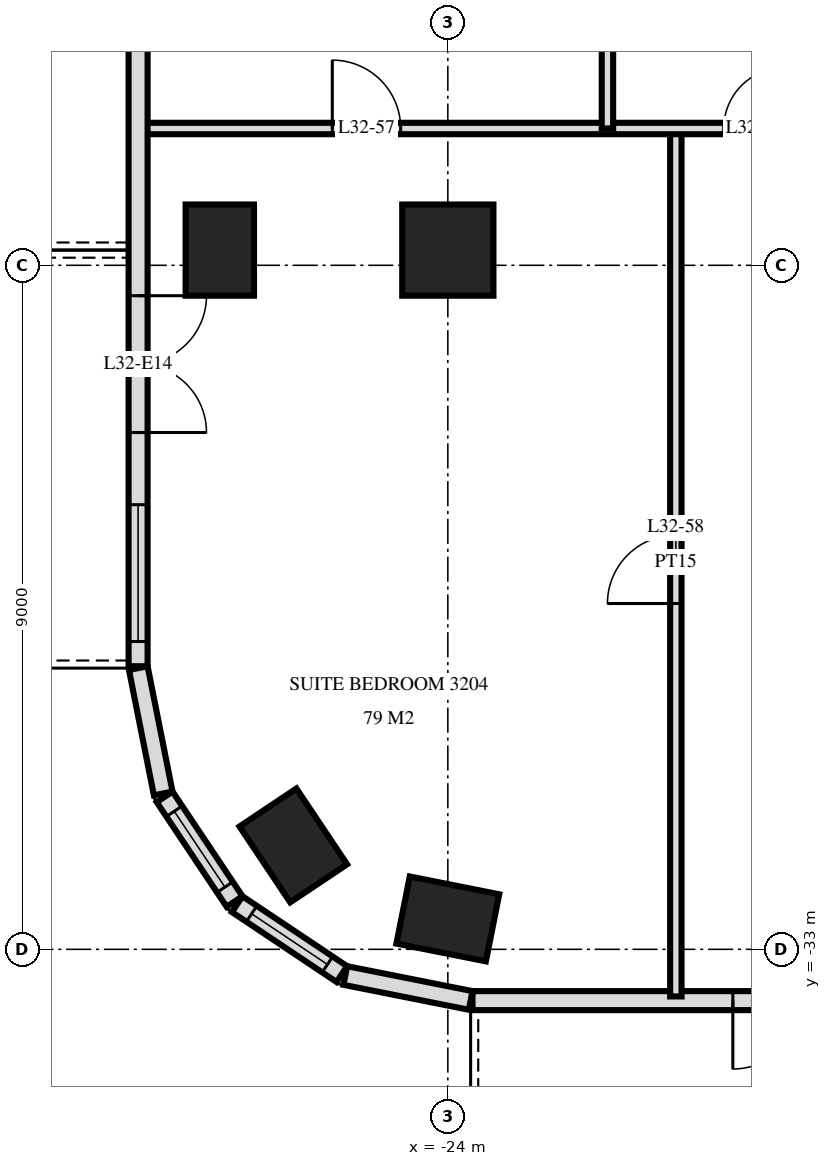
"""IFC4 building model, lengths in metres.
Left out: names, types, materials, properties, quantities, classifications, styles, units other than length and angle.
Written with IfcOpenShell. Run it as: python <this file> out.ifc"""

import sys

from ifc_helpers import new_model, si_unit, direction, frame, frame_2d, origin, origin_2d, place, context, subcontext, project, spatial, rectangle, extrude, element, fill, save


model = new_model("IFC4")
c1 = context("Model", 3, precision=1e-05, world=origin(), true_north=direction((0.0, 1.0)))
c2 = subcontext(c1, "Body", "Model", "MODEL_VIEW")
j1 = project(units=[si_unit("LENGTHUNIT", "METRE"), si_unit("PLANEANGLEUNIT", "RADIAN")], contexts=[c1])
p1 = place(None, origin())
s1 = spatial("IfcSite", under=j1, at=p1, CompositionType="ELEMENT")
p2 = place(p1, origin())
s2 = spatial("IfcBuilding", under=s1, at=p2, CompositionType="ELEMENT")
p3 = place(p2, frame((0.0, 0.0, 127.2)))
s3 = spatial("IfcBuildingStorey", under=s2, at=p3, CompositionType="ELEMENT", Elevation=127.2)
for number, where, z_axis, x_axis in (
    (1, (-27.0, -23.8, 0.0), (0.0, 0.0, 1.0), (0.0, 1.0, 0.0)),
    (2, (-26.033, -31.633, 0.0), (0.0, 0.0, 1.0), (-0.556, 0.831, 0.0)),
    (3, (-24.0, -32.6, 0.0), (0.0, 0.0, 1.0), (-0.981, 0.195, 0.0)),
):
    element("IfcColumn", number, at=place(p3, frame(where, z_axis=z_axis, x_axis=x_axis)), inside=s3, PredefinedType="COLUMN", context=c2, shape_type="SweptSolid", body=[
        extrude(rectangle(XDim=1.2, YDim=0.9, at=origin_2d()), origin(), (0.0, 0.0, 1.0), 3.6),
    ])
p4 = place(p3, frame((-24.0, -23.8, 0.0), z_axis=(0.0, 0.0, 1.0), x_axis=(1.0, 0.0, 0.0)))
e4 = element("IfcColumn", 4, at=p4, inside=s3, PredefinedType="COLUMN", context=c2, shape_type="SweptSolid", body=[
    extrude(rectangle(XDim=1.2, YDim=1.2, at=origin_2d()), origin(), (0.0, 0.0, 1.0), 3.6),
])
p5 = place(p3, frame((-28.075, -3.325, 0.0), z_axis=(0.0, 0.0, 1.0), x_axis=(0.0, -1.0, 0.0)))
e5 = element("IfcWall", 5, at=p5, inside=s3, PredefinedType="SOLIDWALL", context=c2, shape_type="SweptSolid", body=[
    extrude(rectangle(XDim=25.951, YDim=0.25, at=frame_2d((12.975, 0.0))), origin(), (0.0, 0.0, 1.0), 3.32),
])
p6 = place(p5, frame((6.575, 0.0, 0.0)))
e6 = element("IfcOpeningElement", 6, at=p6, cuts=e5, PredefinedType="OPENING", context=c2, shape_type="SweptSolid", body=[
    extrude(rectangle(XDim=1.8, YDim=2.4, at=frame_2d((0.9, 1.2))), frame((0.0, 0.135, 0.0), z_axis=(0.0, -1.0, 0.0), x_axis=(1.0, 0.0, 0.0)), (0.0, 0.0, 1.0), 0.27),
])
p7 = place(p5, frame((9.425, 0.0, 0.3)))
e7 = element("IfcOpeningElement", 7, at=p7, cuts=e5, PredefinedType="OPENING", context=c2, shape_type="SweptSolid", body=[
    extrude(rectangle(XDim=1.8, YDim=2.1, at=frame_2d((0.9, 1.05))), frame((0.0, 0.135, 0.0), z_axis=(0.0, -1.0, 0.0), x_axis=(1.0, 0.0, 0.0)), (0.0, 0.0, 1.0), 0.27),
])
p8 = place(p5, frame((12.575, 0.0, 0.3)))
e8 = element("IfcOpeningElement", 8, at=p8, cuts=e5, PredefinedType="OPENING", context=c2, shape_type="SweptSolid", body=[
    extrude(rectangle(XDim=1.2, YDim=2.1, at=frame_2d((0.6, 1.05))), frame((0.0, 0.135, 0.0), z_axis=(0.0, -1.0, 0.0), x_axis=(1.0, 0.0, 0.0)), (0.0, 0.0, 1.0), 0.27),
])
p9 = place(p5, frame((15.875, 0.0, 0.0)))
e9 = element("IfcOpeningElement", 9, at=p9, cuts=e5, PredefinedType="OPENING", context=c2, shape_type="SweptSolid", body=[
    extrude(rectangle(XDim=1.8, YDim=2.4, at=frame_2d((0.9, 1.2))), frame((0.0, 0.135, 0.0), z_axis=(0.0, -1.0, 0.0), x_axis=(1.0, 0.0, 0.0)), (0.0, 0.0, 1.0), 0.27),
])
p10 = place(p5, frame((21.075, 0.0, 0.0)))
e10 = element("IfcOpeningElement", 10, at=p10, cuts=e5, PredefinedType="OPENING", context=c2, shape_type="SweptSolid", body=[
    extrude(rectangle(XDim=1.8, YDim=2.4, at=frame_2d((0.9, 1.2))), frame((0.0, 0.135, 0.0), z_axis=(0.0, -1.0, 0.0), x_axis=(1.0, 0.0, 0.0)), (0.0, 0.0, 1.0), 0.27),
])
p11 = place(p5, frame((23.825, 0.0, 0.3)))
e11 = element("IfcOpeningElement", 11, at=p11, cuts=e5, PredefinedType="OPENING", context=c2, shape_type="SweptSolid", body=[
    extrude(rectangle(XDim=1.8, YDim=2.1, at=frame_2d((0.9, 1.05))), frame((0.0, 0.135, 0.0), z_axis=(0.0, -1.0, 0.0), x_axis=(1.0, 0.0, 0.0)), (0.0, 0.0, 1.0), 0.27),
])
p12 = place(p3, frame((-28.073, -29.3, 0.0), z_axis=(0.0, 0.0, 1.0), x_axis=(0.194999110559, -0.980803419081, 0.0)))
e12 = element("IfcWall", 12, at=p12, inside=s3, PredefinedType="SOLIDWALL", context=c2, shape_type="SweptSolid", body=[
    extrude(rectangle(XDim=1.681, YDim=0.25, at=frame_2d((0.841, 0.0))), origin(), (0.0, 0.0, 1.0), 3.32),
])
p13 = place(p3, frame((-27.726, -30.994, 0.0), z_axis=(0.0, 0.0, 1.0), x_axis=(0.55555029066, -0.831482937015, 0.0)))
e13 = element("IfcWall", 13, at=p13, inside=s3, PredefinedType="SOLIDWALL", context=c2, shape_type="SweptSolid", body=[
    extrude(rectangle(XDim=1.656, YDim=0.25, at=frame_2d((0.828, 0.0))), origin(), (0.0, 0.0, 1.0), 3.32),
])
p14 = place(p13, frame((0.228, 0.0, 0.9)))
e14 = element("IfcOpeningElement", 14, at=p14, cuts=e13, PredefinedType="OPENING", context=c2, shape_type="SweptSolid", body=[
    extrude(rectangle(XDim=1.2, YDim=1.5, at=frame_2d((0.6, 0.75))), frame((0.0, 0.135, 0.0), z_axis=(0.0, -1.0, 0.0), x_axis=(1.0, 0.0, 0.0)), (0.0, 0.0, 1.0), 0.27),
])
p15 = place(p3, frame((-26.771, -32.406, 0.0), z_axis=(0.0, 0.0, 1.0), x_axis=(0.831482937015, -0.55555029066, 0.0)))
e15 = element("IfcWall", 15, at=p15, inside=s3, PredefinedType="SOLIDWALL", context=c2, shape_type="SweptSolid", body=[
    extrude(rectangle(XDim=1.656, YDim=0.25, at=frame_2d((0.828, 0.0))), origin(), (0.0, 0.0, 1.0), 3.32),
])
p16 = place(p15, frame((0.228, 0.0, 0.9)))
e16 = element("IfcOpeningElement", 16, at=p16, cuts=e15, PredefinedType="OPENING", context=c2, shape_type="SweptSolid", body=[
    extrude(rectangle(XDim=1.2, YDim=1.5, at=frame_2d((0.6, 0.75))), frame((0.0, 0.135, 0.0), z_axis=(0.0, -1.0, 0.0), x_axis=(1.0, 0.0, 0.0)), (0.0, 0.0, 1.0), 0.27),
])
p17 = place(p3, frame((-25.349, -33.344, 0.0), z_axis=(0.0, 0.0, 1.0), x_axis=(0.980775640221, -0.19513878023, 0.0)))
e17 = element("IfcWall", 17, at=p17, inside=s3, PredefinedType="SOLIDWALL", context=c2, shape_type="SweptSolid", body=[
    extrude(rectangle(XDim=1.681, YDim=0.25, at=frame_2d((0.841, 0.0))), origin(), (0.0, 0.0, 1.0), 3.32),
])
p18 = place(p3, frame((-23.675, -33.675, 0.0), z_axis=(0.0, 0.0, 1.0), x_axis=(1.0, 0.0, 0.0)))
e18 = element("IfcWall", 18, at=p18, inside=s3, PredefinedType="SOLIDWALL", context=c2, shape_type="SweptSolid", body=[
    extrude(rectangle(XDim=47.351, YDim=0.25, at=frame_2d((23.675, 0.0))), origin(), (0.0, 0.0, 1.0), 3.32),
])
p19 = place(p18, frame((3.425, 0.0, 0.0)))
e19 = element("IfcOpeningElement", 19, at=p19, cuts=e18, PredefinedType="OPENING", context=c2, shape_type="SweptSolid", body=[
    extrude(rectangle(XDim=1.8, YDim=2.4, at=frame_2d((0.9, 1.2))), frame((0.0, 0.135, 0.0), z_axis=(0.0, -1.0, 0.0), x_axis=(1.0, 0.0, 0.0)), (0.0, 0.0, 1.0), 0.27),
])
p20 = place(p18, frame((6.275, 0.0, 0.0)))
e20 = element("IfcOpeningElement", 20, at=p20, cuts=e18, PredefinedType="OPENING", context=c2, shape_type="SweptSolid", body=[
    extrude(rectangle(XDim=1.8, YDim=2.4, at=frame_2d((0.9, 1.2))), frame((0.0, 0.135, 0.0), z_axis=(0.0, -1.0, 0.0), x_axis=(1.0, 0.0, 0.0)), (0.0, 0.0, 1.0), 0.27),
])
p21 = place(p18, frame((8.975, 0.0, 0.3)))
e21 = element("IfcOpeningElement", 21, at=p21, cuts=e18, PredefinedType="OPENING", context=c2, shape_type="SweptSolid", body=[
    extrude(rectangle(XDim=2.4, YDim=2.1, at=frame_2d((1.2, 1.05))), frame((0.0, 0.135, 0.0), z_axis=(0.0, -1.0, 0.0), x_axis=(1.0, 0.0, 0.0)), (0.0, 0.0, 1.0), 0.27),
])
p22 = place(p18, frame((12.275, 0.0, 0.0)))
e22 = element("IfcOpeningElement", 22, at=p22, cuts=e18, PredefinedType="OPENING", context=c2, shape_type="SweptSolid", body=[
    extrude(rectangle(XDim=1.8, YDim=2.4, at=frame_2d((0.9, 1.2))), frame((0.0, 0.135, 0.0), z_axis=(0.0, -1.0, 0.0), x_axis=(1.0, 0.0, 0.0)), (0.0, 0.0, 1.0), 0.27),
])
p23 = place(p18, frame((14.975, 0.0, 0.3)))
e23 = element("IfcOpeningElement", 23, at=p23, cuts=e18, PredefinedType="OPENING", context=c2, shape_type="SweptSolid", body=[
    extrude(rectangle(XDim=2.4, YDim=2.1, at=frame_2d((1.2, 1.05))), frame((0.0, 0.135, 0.0), z_axis=(0.0, -1.0, 0.0), x_axis=(1.0, 0.0, 0.0)), (0.0, 0.0, 1.0), 0.27),
])
p24 = place(p18, frame((17.975, 0.0, 0.3)))
e24 = element("IfcOpeningElement", 24, at=p24, cuts=e18, PredefinedType="OPENING", context=c2, shape_type="SweptSolid", body=[
    extrude(rectangle(XDim=2.4, YDim=2.1, at=frame_2d((1.2, 1.05))), frame((0.0, 0.135, 0.0), z_axis=(0.0, -1.0, 0.0), x_axis=(1.0, 0.0, 0.0)), (0.0, 0.0, 1.0), 0.27),
])
p25 = place(p18, frame((21.275, 0.0, 0.0)))
e25 = element("IfcOpeningElement", 25, at=p25, cuts=e18, PredefinedType="OPENING", context=c2, shape_type="SweptSolid", body=[
    extrude(rectangle(XDim=1.8, YDim=2.4, at=frame_2d((0.9, 1.2))), frame((0.0, 0.135, 0.0), z_axis=(0.0, -1.0, 0.0), x_axis=(1.0, 0.0, 0.0)), (0.0, 0.0, 1.0), 0.27),
])
p26 = place(p18, frame((24.275, 0.0, 0.0)))
e26 = element("IfcOpeningElement", 26, at=p26, cuts=e18, PredefinedType="OPENING", context=c2, shape_type="SweptSolid", body=[
    extrude(rectangle(XDim=1.8, YDim=2.4, at=frame_2d((0.9, 1.2))), frame((0.0, 0.135, 0.0), z_axis=(0.0, -1.0, 0.0), x_axis=(1.0, 0.0, 0.0)), (0.0, 0.0, 1.0), 0.27),
])
p27 = place(p18, frame((26.975, 0.0, 0.3)))
e27 = element("IfcOpeningElement", 27, at=p27, cuts=e18, PredefinedType="OPENING", context=c2, shape_type="SweptSolid", body=[
    extrude(rectangle(XDim=2.4, YDim=2.1, at=frame_2d((1.2, 1.05))), frame((0.0, 0.135, 0.0), z_axis=(0.0, -1.0, 0.0), x_axis=(1.0, 0.0, 0.0)), (0.0, 0.0, 1.0), 0.27),
])
p28 = place(p18, frame((30.275, 0.0, 0.0)))
e28 = element("IfcOpeningElement", 28, at=p28, cuts=e18, PredefinedType="OPENING", context=c2, shape_type="SweptSolid", body=[
    extrude(rectangle(XDim=1.8, YDim=2.4, at=frame_2d((0.9, 1.2))), frame((0.0, 0.135, 0.0), z_axis=(0.0, -1.0, 0.0), x_axis=(1.0, 0.0, 0.0)), (0.0, 0.0, 1.0), 0.27),
])
p29 = place(p18, frame((32.975, 0.0, 0.3)))
e29 = element("IfcOpeningElement", 29, at=p29, cuts=e18, PredefinedType="OPENING", context=c2, shape_type="SweptSolid", body=[
    extrude(rectangle(XDim=2.4, YDim=2.1, at=frame_2d((1.2, 1.05))), frame((0.0, 0.135, 0.0), z_axis=(0.0, -1.0, 0.0), x_axis=(1.0, 0.0, 0.0)), (0.0, 0.0, 1.0), 0.27),
])
p30 = place(p18, frame((36.275, 0.0, 0.0)))
e30 = element("IfcOpeningElement", 30, at=p30, cuts=e18, PredefinedType="OPENING", context=c2, shape_type="SweptSolid", body=[
    extrude(rectangle(XDim=1.8, YDim=2.4, at=frame_2d((0.9, 1.2))), frame((0.0, 0.135, 0.0), z_axis=(0.0, -1.0, 0.0), x_axis=(1.0, 0.0, 0.0)), (0.0, 0.0, 1.0), 0.27),
])
p31 = place(p18, frame((38.975, 0.0, 0.3)))
e31 = element("IfcOpeningElement", 31, at=p31, cuts=e18, PredefinedType="OPENING", context=c2, shape_type="SweptSolid", body=[
    extrude(rectangle(XDim=2.4, YDim=2.1, at=frame_2d((1.2, 1.05))), frame((0.0, 0.135, 0.0), z_axis=(0.0, -1.0, 0.0), x_axis=(1.0, 0.0, 0.0)), (0.0, 0.0, 1.0), 0.27),
])
p32 = place(p18, frame((41.975, 0.0, 0.3)))
e32 = element("IfcOpeningElement", 32, at=p32, cuts=e18, PredefinedType="OPENING", context=c2, shape_type="SweptSolid", body=[
    extrude(rectangle(XDim=2.4, YDim=2.1, at=frame_2d((1.2, 1.05))), frame((0.0, 0.135, 0.0), z_axis=(0.0, -1.0, 0.0), x_axis=(1.0, 0.0, 0.0)), (0.0, 0.0, 1.0), 0.27),
])
p33 = place(p18, frame((45.125, 0.0, 0.0)))
e33 = element("IfcOpeningElement", 33, at=p33, cuts=e18, PredefinedType="OPENING", context=c2, shape_type="SweptSolid", body=[
    extrude(rectangle(XDim=1.8, YDim=2.4, at=frame_2d((0.9, 1.2))), frame((0.0, 0.135, 0.0), z_axis=(0.0, -1.0, 0.0), x_axis=(1.0, 0.0, 0.0)), (0.0, 0.0, 1.0), 0.27),
])
p34 = place(p3, frame((-21.0, -33.62, 0.0), z_axis=(0.0, 0.0, 1.0), x_axis=(0.0, 1.0, 0.0)))
e34 = element("IfcWall", 34, at=p34, inside=s3, PredefinedType="PARTITIONING", context=c2, shape_type="SweptSolid", body=[
    extrude(rectangle(XDim=11.42, YDim=0.15, at=frame_2d((5.71, 0.0))), origin(), (0.0, 0.0, 1.0), 3.32),
])
p35 = place(p34, frame((5.17, 0.0, 0.0)))
e35 = element("IfcOpeningElement", 35, at=p35, cuts=e34, PredefinedType="OPENING", context=c2, shape_type="SweptSolid", body=[
    extrude(rectangle(XDim=0.9, YDim=2.1, at=frame_2d((0.45, 1.05))), frame((0.0, 0.085, 0.0), z_axis=(0.0, -1.0, 0.0), x_axis=(1.0, 0.0, 0.0)), (0.0, 0.0, 1.0), 0.17),
])
p36 = place(p3, frame((-21.9, -22.2, 0.0), z_axis=(0.0, 0.0, 1.0), x_axis=(0.0, 1.0, 0.0)))
e36 = element("IfcWall", 36, at=p36, inside=s3, PredefinedType="PARTITIONING", context=c2, shape_type="SweptSolid", body=[
    extrude(rectangle(XDim=4.2, YDim=0.15, at=frame_2d((2.1, 0.0))), origin(), (0.0, 0.0, 1.0), 3.32),
])
p37 = place(p3, frame((-28.02, -22.2, 0.0), z_axis=(0.0, 0.0, 1.0), x_axis=(1.0, 0.0, 0.0)))
e37 = element("IfcWall", 37, at=p37, inside=s3, PredefinedType="PARTITIONING", context=c2, shape_type="SweptSolid", body=[
    extrude(rectangle(XDim=9.12, YDim=0.15, at=frame_2d((4.56, 0.0))), origin(), (0.0, 0.0, 1.0), 3.32),
])
p38 = place(p37, frame((7.65, 0.0, 0.0)))
e38 = element("IfcOpeningElement", 38, at=p38, cuts=e37, PredefinedType="OPENING", context=c2, shape_type="SweptSolid", body=[
    extrude(rectangle(XDim=0.8, YDim=2.1, at=frame_2d((0.4, 1.05))), frame((0.0, 0.085, 0.0), z_axis=(0.0, -1.0, 0.0), x_axis=(1.0, 0.0, 0.0)), (0.0, 0.0, 1.0), 0.17),
])
p39 = place(p37, frame((2.5, 0.0, 0.0)))
e39 = element("IfcOpeningElement", 39, at=p39, cuts=e37, PredefinedType="OPENING", context=c2, shape_type="SweptSolid", body=[
    extrude(rectangle(XDim=0.9, YDim=2.1, at=frame_2d((0.45, 1.05))), frame((0.0, 0.085, 0.0), z_axis=(0.0, -1.0, 0.0), x_axis=(1.0, 0.0, 0.0)), (0.0, 0.0, 1.0), 0.17),
])
p40 = place(p14, origin())
e40 = element("IfcWindow", 40, at=p40, inside=s3, PartitioningType="SINGLE_PANEL", PredefinedType="WINDOW", context=c2, shape_type="SweptSolid", body=[
    extrude(rectangle(XDim=1.2, YDim=1.5, at=frame_2d((0.6, 0.75))), frame((0.0, 0.03, 0.0), z_axis=(0.0, -1.0, 0.0), x_axis=(1.0, 0.0, 0.0)), (0.0, 0.0, 1.0), 0.06),
])
fill(e14, e40)
p41 = place(p16, origin())
e41 = element("IfcWindow", 41, at=p41, inside=s3, PartitioningType="SINGLE_PANEL", PredefinedType="WINDOW", context=c2, shape_type="SweptSolid", body=[
    extrude(rectangle(XDim=1.2, YDim=1.5, at=frame_2d((0.6, 0.75))), frame((0.0, 0.03, 0.0), z_axis=(0.0, -1.0, 0.0), x_axis=(1.0, 0.0, 0.0)), (0.0, 0.0, 1.0), 0.06),
])
fill(e16, e41)
p42 = place(p19, frame((0.9, 0.0, 0.0), z_axis=(0.0, 0.0, 1.0), x_axis=(-1.0, 0.0, 0.0)))
e42 = element("IfcDoor", 42, at=p42, inside=s3, OperationType="DOUBLE_DOOR_SINGLE_SWING", PredefinedType="DOOR", context=c2, shape_type="SweptSolid", body=[
    extrude(rectangle(XDim=1.8, YDim=2.4, at=frame_2d((0.0, 1.2))), frame((0.0, -0.025, 0.0), z_axis=(0.0, 1.0, 0.0), x_axis=(-1.0, 0.0, 0.0)), (0.0, 0.0, 1.0), 0.05),
])
fill(e19, e42)
p43 = place(p10, origin())
e43 = element("IfcDoor", 43, at=p43, inside=s3, OperationType="DOUBLE_DOOR_SINGLE_SWING", PredefinedType="DOOR", context=c2, shape_type="SweptSolid", body=[
    extrude(rectangle(XDim=1.8, YDim=2.4, at=frame_2d((0.9, 1.2))), frame((0.0, 0.025, 0.0), z_axis=(0.0, -1.0, 0.0), x_axis=(1.0, 0.0, 0.0)), (0.0, 0.0, 1.0), 0.05),
])
fill(e10, e43)
p44 = place(p11, origin())
e44 = element("IfcWindow", 44, at=p44, inside=s3, PartitioningType="SINGLE_PANEL", PredefinedType="WINDOW", context=c2, shape_type="SweptSolid", body=[
    extrude(rectangle(XDim=1.8, YDim=2.1, at=frame_2d((0.9, 1.05))), frame((0.0, 0.03, 0.0), z_axis=(0.0, -1.0, 0.0), x_axis=(1.0, 0.0, 0.0)), (0.0, 0.0, 1.0), 0.06),
])
fill(e11, e44)
p45 = place(p38, origin())
e45 = element("IfcDoor", 45, at=p45, inside=s3, OperationType="SINGLE_SWING_LEFT", PredefinedType="DOOR", context=c2, shape_type="SweptSolid", body=[
    extrude(rectangle(XDim=0.8, YDim=2.1, at=frame_2d((0.4, 1.05))), frame((0.0, 0.025, 0.0), z_axis=(0.0, -1.0, 0.0), x_axis=(1.0, 0.0, 0.0)), (0.0, 0.0, 1.0), 0.05),
])
fill(e38, e45)
p46 = place(p39, origin())
e46 = element("IfcDoor", 46, at=p46, inside=s3, OperationType="SINGLE_SWING_RIGHT", PredefinedType="DOOR", context=c2, shape_type="SweptSolid", body=[
    extrude(rectangle(XDim=0.9, YDim=2.1, at=frame_2d((0.45, 1.05))), frame((0.0, 0.025, 0.0), z_axis=(0.0, -1.0, 0.0), x_axis=(1.0, 0.0, 0.0)), (0.0, 0.0, 1.0), 0.05),
])
fill(e39, e46)
p47 = place(p35, origin())
e47 = element("IfcDoor", 47, at=p47, inside=s3, OperationType="SINGLE_SWING_RIGHT", PredefinedType="DOOR", context=c2, shape_type="SweptSolid", body=[
    extrude(rectangle(XDim=0.9, YDim=2.1, at=frame_2d((0.45, 1.05))), frame((0.0, 0.025, 0.0), z_axis=(0.0, -1.0, 0.0), x_axis=(1.0, 0.0, 0.0)), (0.0, 0.0, 1.0), 0.05),
])
fill(e35, e47)
save(model, sys.argv[1])
